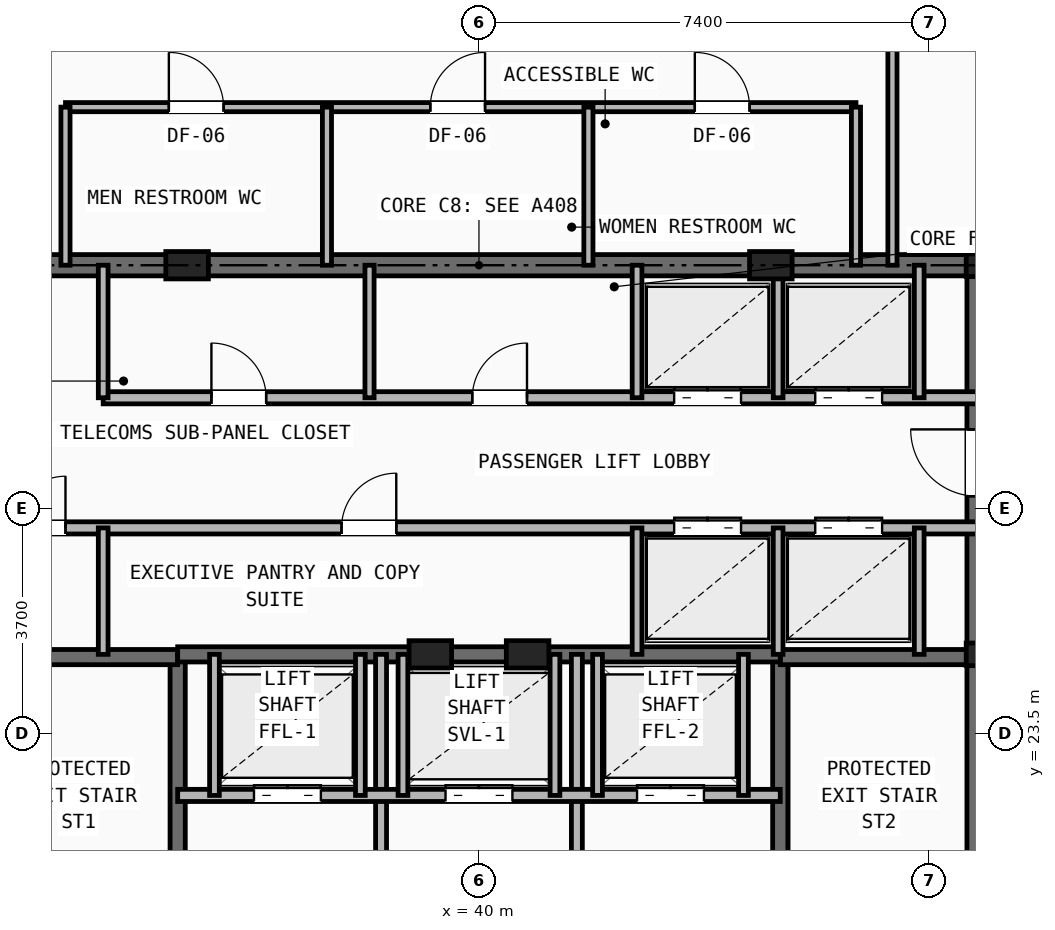
"""IFC4 building model, lengths in metres.
Left out: names, types, materials, properties, quantities, classifications, styles, units other than length and angle.
Written with IfcOpenShell. Run it as: python <this file> out.ifc"""

import sys

from ifc_helpers import new_model, si_unit, direction, frame, frame_2d, origin, origin_2d, place, context, subcontext, project, spatial, rectangle, i_section, extrude, element, fill, save


model = new_model("IFC4")
c1 = context("Model", 3, precision=1e-05, world=origin(), true_north=direction((0.0, 1.0)))
c2 = subcontext(c1, "Body", "Model", "MODEL_VIEW")
j1 = project(units=[si_unit("LENGTHUNIT", "METRE"), si_unit("PLANEANGLEUNIT", "RADIAN")], contexts=[c1])
p1 = place(None, origin())
s1 = spatial("IfcSite", under=j1, at=p1, CompositionType="ELEMENT")
p2 = place(p1, origin())
s2 = spatial("IfcBuilding", under=s1, at=p2, CompositionType="ELEMENT")
p3 = place(p2, frame((0.0, 0.0, 243.4)))
s3 = spatial("IfcBuildingStorey", under=s2, at=p3, CompositionType="ELEMENT", Elevation=243.4)
for number, where, z_axis, x_axis in (
    (1, (48.2, 24.8, 0.0), (0.0, 0.0, 1.0), (1.0, 0.0, 0.0)),
    (2, (48.2, 31.2, 0.0), (0.0, 0.0, 1.0), (1.0, 0.0, 0.0)),
):
    element("IfcColumn", number, at=place(p3, frame(where, z_axis=z_axis, x_axis=x_axis)), inside=s3, PredefinedType="COLUMN", context=c2, shape_type="SweptSolid", body=[
        extrude(i_section(OverallWidth=0.374, OverallDepth=0.372, WebThickness=0.016, FlangeThickness=0.026, at=origin_2d()), origin(), (0.0, 0.0, 1.0), 3.5),
    ])
for number, where, z_axis, x_axis in (
    (3, (35.2, 31.2, 0.0), (0.0, 0.0, 1.0), (1.0, 0.0, 0.0)),
    (4, (44.8, 31.2, 0.0), (0.0, 0.0, 1.0), (1.0, 0.0, 0.0)),
    (5, (39.2, 24.8, 0.0), (0.0, 0.0, 1.0), (1.0, 0.0, 0.0)),
    (6, (40.8, 24.8, 0.0), (0.0, 0.0, 1.0), (1.0, 0.0, 0.0)),
):
    element("IfcColumn", number, at=place(p3, frame(where, z_axis=z_axis, x_axis=x_axis)), inside=s3, PredefinedType="PILASTER", context=c2, shape_type="SweptSolid", body=[
        extrude(rectangle(XDim=0.7, YDim=0.45, at=origin_2d()), origin(), (0.0, 0.0, 1.0), 3.5),
    ])
p4 = place(p3, frame((31.8, 31.2, 0.0), z_axis=(0.0, 0.0, 1.0), x_axis=(1.0, 0.0, 0.0)))
e7 = element("IfcWall", 7, at=p4, inside=s3, PredefinedType="SHEAR", context=c2, shape_type="SweptSolid", body=[
    extrude(rectangle(XDim=16.4, YDim=0.35, at=frame_2d((8.2, 0.0))), origin(), (0.0, 0.0, 1.0), 3.25),
])
p5 = place(p3, frame((48.2, 16.4, 0.0), z_axis=(0.0, 0.0, 1.0), x_axis=(0.0, 1.0, 0.0)))
e8 = element("IfcWall", 8, at=p5, inside=s3, PredefinedType="SHEAR", context=c2, shape_type="SweptSolid", body=[
    extrude(rectangle(XDim=14.8, YDim=0.35, at=frame_2d((7.4, 0.0))), origin(), (0.0, 0.0, 1.0), 3.25),
])
p6 = place(p5, frame((11.0, 0.0, 0.0)))
e9 = element("IfcOpeningElement", 9, at=p6, cuts=e8, PredefinedType="OPENING", context=c2, shape_type="SweptSolid", body=[
    extrude(rectangle(XDim=1.1, YDim=2.15, at=frame_2d((0.55, 1.075))), frame((0.0, 0.185, 0.0), z_axis=(0.0, -1.0, 0.0), x_axis=(1.0, 0.0, 0.0)), (0.0, 0.0, 1.0), 0.37),
])
p7 = place(p3, frame((35.045, 16.4, 0.0), z_axis=(0.0, 0.0, 1.0), x_axis=(0.0, 1.0, 0.0)))
e10 = element("IfcWall", 10, at=p7, inside=s3, PredefinedType="SHEAR", context=c2, shape_type="SweptSolid", body=[
    extrude(rectangle(XDim=8.4, YDim=0.25, at=frame_2d((4.2, 0.0))), origin(), (0.0, 0.0, 1.0), 3.25),
])
p8 = place(p7, frame((0.45, 0.0, 0.0)))
e11 = element("IfcOpeningElement", 11, at=p8, cuts=e10, PredefinedType="OPENING", context=c2, shape_type="SweptSolid", body=[
    extrude(rectangle(XDim=0.95, YDim=2.1, at=frame_2d((0.475, 1.05))), frame((0.0, 0.135, 0.0), z_axis=(0.0, -1.0, 0.0), x_axis=(1.0, 0.0, 0.0)), (0.0, 0.0, 1.0), 0.27),
])
p9 = place(p3, frame((31.8, 24.755, 0.0), z_axis=(0.0, 0.0, 1.0), x_axis=(1.0, 0.0, 0.0)))
e12 = element("IfcWall", 12, at=p9, inside=s3, PredefinedType="SHEAR", context=c2, shape_type="SweptSolid", body=[
    extrude(rectangle(XDim=3.245, YDim=0.25, at=frame_2d((1.623, 0.0))), origin(), (0.0, 0.0, 1.0), 3.25),
])
p10 = place(p3, frame((44.955, 16.4, 0.0), z_axis=(0.0, 0.0, 1.0), x_axis=(0.0, 1.0, 0.0)))
e13 = element("IfcWall", 13, at=p10, inside=s3, PredefinedType="SHEAR", context=c2, shape_type="SweptSolid", body=[
    extrude(rectangle(XDim=8.4, YDim=0.25, at=frame_2d((4.2, 0.0))), origin(), (0.0, 0.0, 1.0), 3.25),
])
p11 = place(p10, frame((0.45, 0.0, 0.0)))
e14 = element("IfcOpeningElement", 14, at=p11, cuts=e13, PredefinedType="OPENING", context=c2, shape_type="SweptSolid", body=[
    extrude(rectangle(XDim=0.95, YDim=2.1, at=frame_2d((0.475, 1.05))), frame((0.0, 0.135, 0.0), z_axis=(0.0, -1.0, 0.0), x_axis=(1.0, 0.0, 0.0)), (0.0, 0.0, 1.0), 0.27),
])
p12 = place(p3, frame((44.955, 24.755, 0.0), z_axis=(0.0, 0.0, 1.0), x_axis=(1.0, 0.0, 0.0)))
e15 = element("IfcWall", 15, at=p12, inside=s3, PredefinedType="SHEAR", context=c2, shape_type="SweptSolid", body=[
    extrude(rectangle(XDim=3.245, YDim=0.25, at=frame_2d((1.623, 0.0))), origin(), (0.0, 0.0, 1.0), 3.25),
])
p13 = place(p3, frame((35.045, 24.8, 0.0), z_axis=(0.0, 0.0, 1.0), x_axis=(1.0, 0.0, 0.0)))
e16 = element("IfcWall", 16, at=p13, inside=s3, PredefinedType="SHEAR", context=c2, shape_type="SweptSolid", body=[
    extrude(rectangle(XDim=9.91, YDim=0.25, at=frame_2d((4.955, 0.0))), origin(), (0.0, 0.0, 1.0), 3.25),
])
p14 = place(p3, frame((38.39, 16.4, 0.0), z_axis=(0.0, 0.0, 1.0), x_axis=(0.0, 1.0, 0.0)))
e17 = element("IfcWall", 17, at=p14, inside=s3, PredefinedType="PARTITIONING", context=c2, shape_type="SweptSolid", body=[
    extrude(rectangle(XDim=8.4, YDim=0.18, at=frame_2d((4.2, 0.0))), origin(), (0.0, 0.0, 1.0), 2.705),
])
p15 = place(p14, frame((3.85, 0.0, 0.0)))
e18 = element("IfcOpeningElement", 18, at=p15, cuts=e17, PredefinedType="OPENING", context=c2, shape_type="SweptSolid", body=[
    extrude(rectangle(XDim=0.95, YDim=2.1, at=frame_2d((0.475, 1.05))), frame((0.0, 0.1, 0.0), z_axis=(0.0, -1.0, 0.0), x_axis=(1.0, 0.0, 0.0)), (0.0, 0.0, 1.0), 0.2),
])
p16 = place(p3, frame((41.61, 16.4, 0.0), z_axis=(0.0, 0.0, 1.0), x_axis=(0.0, 1.0, 0.0)))
e19 = element("IfcWall", 19, at=p16, inside=s3, PredefinedType="PARTITIONING", context=c2, shape_type="SweptSolid", body=[
    extrude(rectangle(XDim=8.4, YDim=0.18, at=frame_2d((4.2, 0.0))), origin(), (0.0, 0.0, 1.0), 2.705),
])
p17 = place(p3, frame((35.045, 22.48, 0.0), z_axis=(0.0, 0.0, 1.0), x_axis=(1.0, 0.0, 0.0)))
e20 = element("IfcWall", 20, at=p17, inside=s3, PredefinedType="SOLIDWALL", context=c2, shape_type="SweptSolid", body=[
    extrude(rectangle(XDim=9.91, YDim=0.2, at=frame_2d((4.955, 0.0))), origin(), (0.0, 0.0, 1.0), 3.25),
])
p18 = place(p17, frame((1.255, 0.0, 0.0)))
e21 = element("IfcOpeningElement", 21, at=p18, cuts=e20, PredefinedType="OPENING", context=c2, shape_type="SweptSolid", body=[
    extrude(rectangle(XDim=1.1, YDim=2.15, at=frame_2d((0.55, 1.075))), frame((0.0, 0.11, 0.0), z_axis=(0.0, -1.0, 0.0), x_axis=(1.0, 0.0, 0.0)), (0.0, 0.0, 1.0), 0.22),
])
p19 = place(p17, frame((7.555, 0.0, 0.0)))
e22 = element("IfcOpeningElement", 22, at=p19, cuts=e20, PredefinedType="OPENING", context=c2, shape_type="SweptSolid", body=[
    extrude(rectangle(XDim=1.1, YDim=2.15, at=frame_2d((0.55, 1.075))), frame((0.0, 0.11, 0.0), z_axis=(0.0, -1.0, 0.0), x_axis=(1.0, 0.0, 0.0)), (0.0, 0.0, 1.0), 0.22),
])
p20 = place(p17, frame((4.405, 0.0, 0.0)))
e23 = element("IfcOpeningElement", 23, at=p20, cuts=e20, PredefinedType="OPENING", context=c2, shape_type="SweptSolid", body=[
    extrude(rectangle(XDim=1.1, YDim=2.15, at=frame_2d((0.55, 1.075))), frame((0.0, 0.11, 0.0), z_axis=(0.0, -1.0, 0.0), x_axis=(1.0, 0.0, 0.0)), (0.0, 0.0, 1.0), 0.22),
])
for number, where, z_axis, x_axis in (
    (24, (35.65, 22.48, 0.0), (0.0, 0.0, 1.0), (0.0, 1.0, 0.0)),
    (25, (38.05, 22.48, 0.0), (0.0, 0.0, 1.0), (0.0, 1.0, 0.0)),
    (26, (41.95, 22.48, 0.0), (0.0, 0.0, 1.0), (0.0, 1.0, 0.0)),
    (27, (44.35, 22.48, 0.0), (0.0, 0.0, 1.0), (0.0, 1.0, 0.0)),
    (28, (38.75, 22.48, 0.0), (0.0, 0.0, 1.0), (0.0, 1.0, 0.0)),
    (29, (41.25, 22.48, 0.0), (0.0, 0.0, 1.0), (0.0, 1.0, 0.0)),
):
    element("IfcWall", number, at=place(p3, frame(where, z_axis=z_axis, x_axis=x_axis)), inside=s3, PredefinedType="SOLIDWALL", context=c2, shape_type="SweptSolid", body=[
        extrude(rectangle(XDim=2.32, YDim=0.16, at=frame_2d((1.16, 0.0))), origin(), (0.0, 0.0, 1.0), 3.25),
    ])
p21 = place(p3, frame((33.82, 29.02, 0.0), z_axis=(0.0, 0.0, 1.0), x_axis=(1.0, 0.0, 0.0)))
e30 = element("IfcWall", 30, at=p21, inside=s3, PredefinedType="SOLIDWALL", context=c2, shape_type="SweptSolid", body=[
    extrude(rectangle(XDim=14.38, YDim=0.2, at=frame_2d((7.19, 0.0))), origin(), (0.0, 0.0, 1.0), 2.705),
])
p22 = place(p21, frame((1.78, 0.0, 0.0)))
e31 = element("IfcOpeningElement", 31, at=p22, cuts=e30, PredefinedType="OPENING", context=c2, shape_type="SweptSolid", body=[
    extrude(rectangle(XDim=0.9, YDim=2.1, at=frame_2d((0.45, 1.05))), frame((0.0, 0.11, 0.0), z_axis=(0.0, -1.0, 0.0), x_axis=(1.0, 0.0, 0.0)), (0.0, 0.0, 1.0), 0.22),
])
p23 = place(p21, frame((6.07, 0.0, 0.0)))
e32 = element("IfcOpeningElement", 32, at=p23, cuts=e30, PredefinedType="OPENING", context=c2, shape_type="SweptSolid", body=[
    extrude(rectangle(XDim=0.9, YDim=2.1, at=frame_2d((0.45, 1.05))), frame((0.0, 0.11, 0.0), z_axis=(0.0, -1.0, 0.0), x_axis=(1.0, 0.0, 0.0)), (0.0, 0.0, 1.0), 0.22),
])
p24 = place(p21, frame((9.39, 0.0, 0.0)))
e33 = element("IfcOpeningElement", 33, at=p24, cuts=e30, PredefinedType="OPENING", context=c2, shape_type="SweptSolid", body=[
    extrude(rectangle(XDim=1.1, YDim=2.15, at=frame_2d((0.55, 1.075))), frame((0.0, 0.11, 0.0), z_axis=(0.0, -1.0, 0.0), x_axis=(1.0, 0.0, 0.0)), (0.0, 0.0, 1.0), 0.22),
])
p25 = place(p21, frame((11.71, 0.0, 0.0)))
e34 = element("IfcOpeningElement", 34, at=p25, cuts=e30, PredefinedType="OPENING", context=c2, shape_type="SweptSolid", body=[
    extrude(rectangle(XDim=1.1, YDim=2.15, at=frame_2d((0.55, 1.075))), frame((0.0, 0.11, 0.0), z_axis=(0.0, -1.0, 0.0), x_axis=(1.0, 0.0, 0.0)), (0.0, 0.0, 1.0), 0.22),
])
p26 = place(p3, frame((31.8, 26.88, 0.0), z_axis=(0.0, 0.0, 1.0), x_axis=(1.0, 0.0, 0.0)))
e35 = element("IfcWall", 35, at=p26, inside=s3, PredefinedType="SOLIDWALL", context=c2, shape_type="SweptSolid", body=[
    extrude(rectangle(XDim=16.4, YDim=0.2, at=frame_2d((8.2, 0.0))), origin(), (0.0, 0.0, 1.0), 2.705),
])
p27 = place(p26, frame((0.55, 0.0, 0.0)))
e36 = element("IfcOpeningElement", 36, at=p27, cuts=e35, PredefinedType="OPENING", context=c2, shape_type="SweptSolid", body=[
    extrude(rectangle(XDim=0.85, YDim=2.05, at=frame_2d((0.425, 1.025))), frame((0.0, 0.11, 0.0), z_axis=(0.0, -1.0, 0.0), x_axis=(1.0, 0.0, 0.0)), (0.0, 0.0, 1.0), 0.22),
])
p28 = place(p26, frame((5.94, 0.0, 0.0)))
e37 = element("IfcOpeningElement", 37, at=p28, cuts=e35, PredefinedType="OPENING", context=c2, shape_type="SweptSolid", body=[
    extrude(rectangle(XDim=0.9, YDim=2.1, at=frame_2d((0.45, 1.05))), frame((0.0, 0.11, 0.0), z_axis=(0.0, -1.0, 0.0), x_axis=(1.0, 0.0, 0.0)), (0.0, 0.0, 1.0), 0.22),
])
p29 = place(p26, frame((11.41, 0.0, 0.0)))
e38 = element("IfcOpeningElement", 38, at=p29, cuts=e35, PredefinedType="OPENING", context=c2, shape_type="SweptSolid", body=[
    extrude(rectangle(XDim=1.1, YDim=2.15, at=frame_2d((0.55, 1.075))), frame((0.0, 0.11, 0.0), z_axis=(0.0, -1.0, 0.0), x_axis=(1.0, 0.0, 0.0)), (0.0, 0.0, 1.0), 0.22),
])
p30 = place(p26, frame((13.73, 0.0, 0.0)))
e39 = element("IfcOpeningElement", 39, at=p30, cuts=e35, PredefinedType="OPENING", context=c2, shape_type="SweptSolid", body=[
    extrude(rectangle(XDim=1.1, YDim=2.15, at=frame_2d((0.55, 1.075))), frame((0.0, 0.11, 0.0), z_axis=(0.0, -1.0, 0.0), x_axis=(1.0, 0.0, 0.0)), (0.0, 0.0, 1.0), 0.22),
])
p31 = place(p3, frame((33.82, 29.02, 0.0), z_axis=(0.0, 0.0, 1.0), x_axis=(0.0, 1.0, 0.0)))
e40 = element("IfcWall", 40, at=p31, inside=s3, PredefinedType="SOLIDWALL", context=c2, shape_type="SweptSolid", body=[
    extrude(rectangle(XDim=2.18, YDim=0.16, at=frame_2d((1.09, 0.0))), origin(), (0.0, 0.0, 1.0), 2.705),
])
p32 = place(p3, frame((33.82, 24.8, 0.0), z_axis=(0.0, 0.0, 1.0), x_axis=(0.0, 1.0, 0.0)))
e41 = element("IfcWall", 41, at=p32, inside=s3, PredefinedType="SOLIDWALL", context=c2, shape_type="SweptSolid", body=[
    extrude(rectangle(XDim=2.08, YDim=0.16, at=frame_2d((1.04, 0.0))), origin(), (0.0, 0.0, 1.0), 3.25),
])
p33 = place(p3, frame((38.2, 29.02, 0.0), z_axis=(0.0, 0.0, 1.0), x_axis=(0.0, 1.0, 0.0)))
e42 = element("IfcWall", 42, at=p33, inside=s3, PredefinedType="PARTITIONING", context=c2, shape_type="SweptSolid", body=[
    extrude(rectangle(XDim=2.18, YDim=0.15, at=frame_2d((1.09, 0.0))), origin(), (0.0, 0.0, 1.0), 2.705),
])
for number, where, z_axis, x_axis in (
    (43, (42.6, 29.02, 0.0), (0.0, 0.0, 1.0), (0.0, 1.0, 0.0)),
    (44, (44.92, 29.02, 0.0), (0.0, 0.0, 1.0), (0.0, 1.0, 0.0)),
    (45, (47.24, 29.02, 0.0), (0.0, 0.0, 1.0), (0.0, 1.0, 0.0)),
):
    element("IfcWall", number, at=place(p3, frame(where, z_axis=z_axis, x_axis=x_axis)), inside=s3, PredefinedType="SOLIDWALL", context=c2, shape_type="SweptSolid", body=[
        extrude(rectangle(XDim=2.18, YDim=0.16, at=frame_2d((1.09, 0.0))), origin(), (0.0, 0.0, 1.0), 2.705),
    ])
for number, where, z_axis, x_axis in (
    (46, (42.6, 24.8, 0.0), (0.0, 0.0, 1.0), (0.0, 1.0, 0.0)),
    (47, (44.92, 24.8, 0.0), (0.0, 0.0, 1.0), (0.0, 1.0, 0.0)),
    (48, (47.24, 24.8, 0.0), (0.0, 0.0, 1.0), (0.0, 1.0, 0.0)),
):
    element("IfcWall", number, at=place(p3, frame(where, z_axis=z_axis, x_axis=x_axis)), inside=s3, PredefinedType="SOLIDWALL", context=c2, shape_type="SweptSolid", body=[
        extrude(rectangle(XDim=2.08, YDim=0.16, at=frame_2d((1.04, 0.0))), origin(), (0.0, 0.0, 1.0), 3.25),
    ])
p34 = place(p3, frame((33.2, 33.8, 0.0), z_axis=(0.0, 0.0, 1.0), x_axis=(1.0, 0.0, 0.0)))
e49 = element("IfcWall", 49, at=p34, inside=s3, PredefinedType="PARTITIONING", context=c2, shape_type="SweptSolid", body=[
    extrude(rectangle(XDim=13.0, YDim=0.15, at=frame_2d((6.5, 0.0))), origin(), (0.0, 0.0, 1.0), 3.25),
])
p35 = place(p34, frame((1.7, 0.0, 0.0)))
e50 = element("IfcOpeningElement", 50, at=p35, cuts=e49, PredefinedType="OPENING", context=c2, shape_type="SweptSolid", body=[
    extrude(rectangle(XDim=0.9, YDim=2.1, at=frame_2d((0.45, 1.05))), frame((0.0, 0.085, 0.0), z_axis=(0.0, -1.0, 0.0), x_axis=(1.0, 0.0, 0.0)), (0.0, 0.0, 1.0), 0.17),
])
p36 = place(p34, frame((6.0, 0.0, 0.0)))
e51 = element("IfcOpeningElement", 51, at=p36, cuts=e49, PredefinedType="OPENING", context=c2, shape_type="SweptSolid", body=[
    extrude(rectangle(XDim=0.9, YDim=2.1, at=frame_2d((0.45, 1.05))), frame((0.0, 0.085, 0.0), z_axis=(0.0, -1.0, 0.0), x_axis=(1.0, 0.0, 0.0)), (0.0, 0.0, 1.0), 0.17),
])
p37 = place(p34, frame((10.35, 0.0, 0.0)))
e52 = element("IfcOpeningElement", 52, at=p37, cuts=e49, PredefinedType="OPENING", context=c2, shape_type="SweptSolid", body=[
    extrude(rectangle(XDim=0.9, YDim=2.1, at=frame_2d((0.45, 1.05))), frame((0.0, 0.085, 0.0), z_axis=(0.0, -1.0, 0.0), x_axis=(1.0, 0.0, 0.0)), (0.0, 0.0, 1.0), 0.17),
])
for number, where, z_axis, x_axis in (
    (53, (33.2, 31.2, 0.0), (0.0, 0.0, 1.0), (0.0, 1.0, 0.0)),
    (54, (46.2, 31.2, 0.0), (0.0, 0.0, 1.0), (0.0, 1.0, 0.0)),
    (55, (37.5, 31.2, 0.0), (0.0, 0.0, 1.0), (0.0, 1.0, 0.0)),
    (56, (41.8, 31.2, 0.0), (0.0, 0.0, 1.0), (0.0, 1.0, 0.0)),
):
    element("IfcWall", number, at=place(p3, frame(where, z_axis=z_axis, x_axis=x_axis)), inside=s3, PredefinedType="PARTITIONING", context=c2, shape_type="SweptSolid", body=[
        extrude(rectangle(XDim=2.6, YDim=0.15, at=frame_2d((1.3, 0.0))), origin(), (0.0, 0.0, 1.0), 2.705),
    ])
p38 = place(p3, frame((46.8, 31.2, 0.0), z_axis=(0.0, 0.0, 1.0), x_axis=(0.0, 1.0, 0.0)))
e57 = element("IfcWall", 57, at=p38, inside=s3, PredefinedType="PARTITIONING", context=c2, shape_type="SweptSolid", body=[
    extrude(rectangle(XDim=4.5, YDim=0.15, at=frame_2d((2.25, 0.0))), origin(), (0.0, 0.0, 1.0), 2.705),
])
p39 = place(p18, origin())
e58 = element("IfcDoor", 58, at=p39, inside=s3, OperationType="DOUBLE_DOOR_SLIDING", PredefinedType="DOOR", context=c2, shape_type="SweptSolid", body=[
    extrude(rectangle(XDim=1.1, YDim=2.15, at=frame_2d((0.55, 1.075))), frame((0.0, 0.025, 0.0), z_axis=(0.0, -1.0, 0.0), x_axis=(1.0, 0.0, 0.0)), (0.0, 0.0, 1.0), 0.05),
])
fill(e21, e58)
p40 = place(p19, origin())
e59 = element("IfcDoor", 59, at=p40, inside=s3, OperationType="DOUBLE_DOOR_SLIDING", PredefinedType="DOOR", context=c2, shape_type="SweptSolid", body=[
    extrude(rectangle(XDim=1.1, YDim=2.15, at=frame_2d((0.55, 1.075))), frame((0.0, 0.025, 0.0), z_axis=(0.0, -1.0, 0.0), x_axis=(1.0, 0.0, 0.0)), (0.0, 0.0, 1.0), 0.05),
])
fill(e22, e59)
p41 = place(p20, origin())
e60 = element("IfcDoor", 60, at=p41, inside=s3, OperationType="DOUBLE_DOOR_SLIDING", PredefinedType="DOOR", context=c2, shape_type="SweptSolid", body=[
    extrude(rectangle(XDim=1.1, YDim=2.15, at=frame_2d((0.55, 1.075))), frame((0.0, 0.025, 0.0), z_axis=(0.0, -1.0, 0.0), x_axis=(1.0, 0.0, 0.0)), (0.0, 0.0, 1.0), 0.05),
])
fill(e23, e60)
p42 = place(p27, origin())
e61 = element("IfcDoor", 61, at=p42, inside=s3, OperationType="SINGLE_SWING_RIGHT", PredefinedType="DOOR", context=c2, shape_type="SweptSolid", body=[
    extrude(rectangle(XDim=0.85, YDim=2.05, at=frame_2d((0.425, 1.025))), frame((0.0, 0.025, 0.0), z_axis=(0.0, -1.0, 0.0), x_axis=(1.0, 0.0, 0.0)), (0.0, 0.0, 1.0), 0.05),
])
fill(e36, e61)
p43 = place(p22, origin())
e62 = element("IfcDoor", 62, at=p43, inside=s3, OperationType="SINGLE_SWING_LEFT", PredefinedType="DOOR", context=c2, shape_type="SweptSolid", body=[
    extrude(rectangle(XDim=0.9, YDim=2.1, at=frame_2d((0.45, 1.05))), frame((0.0, 0.025, 0.0), z_axis=(0.0, -1.0, 0.0), x_axis=(1.0, 0.0, 0.0)), (0.0, 0.0, 1.0), 0.05),
])
fill(e31, e62)
p44 = place(p23, origin())
e63 = element("IfcDoor", 63, at=p44, inside=s3, OperationType="SINGLE_SWING_RIGHT", PredefinedType="DOOR", context=c2, shape_type="SweptSolid", body=[
    extrude(rectangle(XDim=0.9, YDim=2.1, at=frame_2d((0.45, 1.05))), frame((0.0, 0.025, 0.0), z_axis=(0.0, -1.0, 0.0), x_axis=(1.0, 0.0, 0.0)), (0.0, 0.0, 1.0), 0.05),
])
fill(e32, e63)
p45 = place(p28, origin())
e64 = element("IfcDoor", 64, at=p45, inside=s3, OperationType="SINGLE_SWING_RIGHT", PredefinedType="DOOR", context=c2, shape_type="SweptSolid", body=[
    extrude(rectangle(XDim=0.9, YDim=2.1, at=frame_2d((0.45, 1.05))), frame((0.0, 0.025, 0.0), z_axis=(0.0, -1.0, 0.0), x_axis=(1.0, 0.0, 0.0)), (0.0, 0.0, 1.0), 0.05),
])
fill(e37, e64)
p46 = place(p24, origin())
e65 = element("IfcDoor", 65, at=p46, inside=s3, OperationType="DOUBLE_DOOR_SLIDING", PredefinedType="DOOR", context=c2, shape_type="SweptSolid", body=[
    extrude(rectangle(XDim=1.1, YDim=2.15, at=frame_2d((0.55, 1.075))), frame((0.0, 0.025, 0.0), z_axis=(0.0, -1.0, 0.0), x_axis=(1.0, 0.0, 0.0)), (0.0, 0.0, 1.0), 0.05),
])
fill(e33, e65)
p47 = place(p25, origin())
e66 = element("IfcDoor", 66, at=p47, inside=s3, OperationType="DOUBLE_DOOR_SLIDING", PredefinedType="DOOR", context=c2, shape_type="SweptSolid", body=[
    extrude(rectangle(XDim=1.1, YDim=2.15, at=frame_2d((0.55, 1.075))), frame((0.0, 0.025, 0.0), z_axis=(0.0, -1.0, 0.0), x_axis=(1.0, 0.0, 0.0)), (0.0, 0.0, 1.0), 0.05),
])
fill(e34, e66)
p48 = place(p29, origin())
e67 = element("IfcDoor", 67, at=p48, inside=s3, OperationType="DOUBLE_DOOR_SLIDING", PredefinedType="DOOR", context=c2, shape_type="SweptSolid", body=[
    extrude(rectangle(XDim=1.1, YDim=2.15, at=frame_2d((0.55, 1.075))), frame((0.0, 0.025, 0.0), z_axis=(0.0, -1.0, 0.0), x_axis=(1.0, 0.0, 0.0)), (0.0, 0.0, 1.0), 0.05),
])
fill(e38, e67)
p49 = place(p30, origin())
e68 = element("IfcDoor", 68, at=p49, inside=s3, OperationType="DOUBLE_DOOR_SLIDING", PredefinedType="DOOR", context=c2, shape_type="SweptSolid", body=[
    extrude(rectangle(XDim=1.1, YDim=2.15, at=frame_2d((0.55, 1.075))), frame((0.0, 0.025, 0.0), z_axis=(0.0, -1.0, 0.0), x_axis=(1.0, 0.0, 0.0)), (0.0, 0.0, 1.0), 0.05),
])
fill(e39, e68)
p50 = place(p35, origin())
e69 = element("IfcDoor", 69, at=p50, inside=s3, OperationType="SINGLE_SWING_LEFT", PredefinedType="DOOR", context=c2, shape_type="SweptSolid", body=[
    extrude(rectangle(XDim=0.9, YDim=2.1, at=frame_2d((0.45, 1.05))), frame((0.0, 0.025, 0.0), z_axis=(0.0, -1.0, 0.0), x_axis=(1.0, 0.0, 0.0)), (0.0, 0.0, 1.0), 0.05),
])
fill(e50, e69)
p51 = place(p36, origin())
e70 = element("IfcDoor", 70, at=p51, inside=s3, OperationType="SINGLE_SWING_RIGHT", PredefinedType="DOOR", context=c2, shape_type="SweptSolid", body=[
    extrude(rectangle(XDim=0.9, YDim=2.1, at=frame_2d((0.45, 1.05))), frame((0.0, 0.025, 0.0), z_axis=(0.0, -1.0, 0.0), x_axis=(1.0, 0.0, 0.0)), (0.0, 0.0, 1.0), 0.05),
])
fill(e51, e70)
p52 = place(p37, origin())
e71 = element("IfcDoor", 71, at=p52, inside=s3, OperationType="SINGLE_SWING_LEFT", PredefinedType="DOOR", context=c2, shape_type="SweptSolid", body=[
    extrude(rectangle(XDim=0.9, YDim=2.1, at=frame_2d((0.45, 1.05))), frame((0.0, 0.025, 0.0), z_axis=(0.0, -1.0, 0.0), x_axis=(1.0, 0.0, 0.0)), (0.0, 0.0, 1.0), 0.05),
])
fill(e52, e71)
save(model, sys.argv[1])
